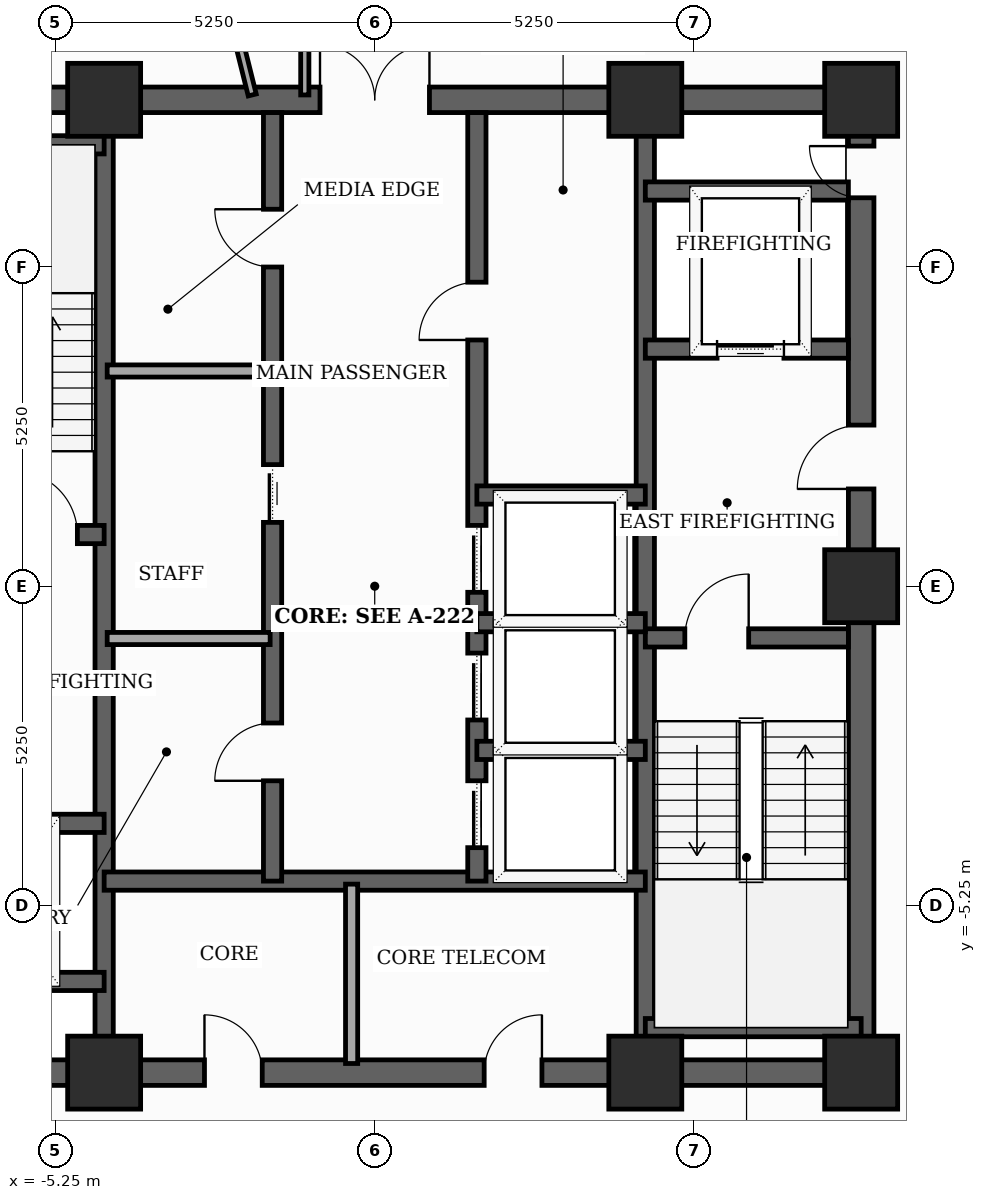
"""IFC4 building model, lengths in metres.
Left out: names, types, materials, properties, quantities, classifications, styles, units other than length and angle.
Written with IfcOpenShell. Run it as: python <this file> out.ifc"""

import sys

from ifc_helpers import new_model, si_unit, direction, frame, frame_2d, origin, origin_2d, place, context, subcontext, project, spatial, rectangle, extrude, element, fill, save


model = new_model("IFC4")
c1 = context("Model", 3, precision=1e-05, world=origin(), true_north=direction((0.0, 1.0)))
c2 = subcontext(c1, "Body", "Model", "MODEL_VIEW")
j1 = project(units=[si_unit("LENGTHUNIT", "METRE"), si_unit("PLANEANGLEUNIT", "RADIAN")], contexts=[c1])
p1 = place(None, origin())
s1 = spatial("IfcSite", under=j1, at=p1, CompositionType="ELEMENT")
p2 = place(p1, origin())
s2 = spatial("IfcBuilding", under=s1, at=p2, CompositionType="ELEMENT")
p3 = place(p2, frame((0.0, 0.0, 226.3)))
s3 = spatial("IfcBuildingStorey", under=s2, at=p3, CompositionType="ELEMENT", Elevation=226.3)
for number, where, z_axis, x_axis in (
    (1, (-4.45, -8.0, 0.0), (0.0, 0.0, 1.0), (1.0, 0.0, 0.0)),
    (2, (4.45, -8.0, 0.0), (0.0, 0.0, 1.0), (1.0, 0.0, 0.0)),
    (3, (8.0, -8.0, 0.0), (0.0, 0.0, 1.0), (1.0, 0.0, 0.0)),
    (4, (8.0, 0.0, 0.0), (0.0, 0.0, 1.0), (1.0, 0.0, 0.0)),
    (5, (8.0, 8.0, 0.0), (0.0, 0.0, 1.0), (1.0, 0.0, 0.0)),
    (6, (4.45, 8.0, 0.0), (0.0, 0.0, 1.0), (1.0, 0.0, 0.0)),
    (7, (-4.45, 8.0, 0.0), (0.0, 0.0, 1.0), (1.0, 0.0, 0.0)),
):
    element("IfcColumn", number, at=place(p3, frame(where, z_axis=z_axis, x_axis=x_axis)), inside=s3, PredefinedType="COLUMN", context=c2, shape_type="SweptSolid", body=[
        extrude(rectangle(XDim=1.2, YDim=1.2, at=origin_2d()), origin(), (0.0, 0.0, 1.0), 3.7),
    ])
p4 = place(p3, frame((8.0, -8.0, 0.0), z_axis=(0.0, 0.0, 1.0), x_axis=(0.0, 1.0, 0.0)))
e8 = element("IfcWall", 8, at=p4, inside=s3, PredefinedType="SHEAR", context=c2, shape_type="SweptSolid", body=[
    extrude(rectangle(XDim=16.0, YDim=0.42, at=frame_2d((8.0, 0.0))), origin(), (0.0, 0.0, 1.0), 3.5),
])
p5 = place(p4, frame((9.6, 0.0, 0.0)))
e9 = element("IfcOpeningElement", 9, at=p5, cuts=e8, PredefinedType="OPENING", context=c2, shape_type="SweptSolid", body=[
    extrude(rectangle(XDim=1.05, YDim=2.15, at=frame_2d((0.525, 1.075))), frame((0.0, 0.22, 0.0), z_axis=(0.0, -1.0, 0.0), x_axis=(1.0, 0.0, 0.0)), (0.0, 0.0, 1.0), 0.44),
])
p6 = place(p4, frame((14.389, 0.0, 0.0)))
e10 = element("IfcOpeningElement", 10, at=p6, cuts=e8, PredefinedType="OPENING", context=c2, shape_type="SweptSolid", body=[
    extrude(rectangle(XDim=0.85, YDim=2.02, at=frame_2d((0.425, 1.01))), frame((0.0, 0.22, 0.0), z_axis=(0.0, -1.0, 0.0), x_axis=(1.0, 0.0, 0.0)), (0.0, 0.0, 1.0), 0.44),
])
p7 = place(p3, frame((-8.0, -8.0, 0.0), z_axis=(0.0, 0.0, 1.0), x_axis=(1.0, 0.0, 0.0)))
e11 = element("IfcWall", 11, at=p7, inside=s3, PredefinedType="SHEAR", context=c2, shape_type="SweptSolid", body=[
    extrude(rectangle(XDim=16.0, YDim=0.42, at=frame_2d((8.0, 0.0))), origin(), (0.0, 0.0, 1.0), 3.5),
])
p8 = place(p7, frame((5.2, 0.0, 0.0)))
e12 = element("IfcOpeningElement", 12, at=p8, cuts=e11, PredefinedType="OPENING", context=c2, shape_type="SweptSolid", body=[
    extrude(rectangle(XDim=0.95, YDim=2.1, at=frame_2d((0.475, 1.05))), frame((0.0, 0.22, 0.0), z_axis=(0.0, -1.0, 0.0), x_axis=(1.0, 0.0, 0.0)), (0.0, 0.0, 1.0), 0.44),
])
p9 = place(p7, frame((9.8, 0.0, 0.0)))
e13 = element("IfcOpeningElement", 13, at=p9, cuts=e11, PredefinedType="OPENING", context=c2, shape_type="SweptSolid", body=[
    extrude(rectangle(XDim=0.95, YDim=2.1, at=frame_2d((0.475, 1.05))), frame((0.0, 0.22, 0.0), z_axis=(0.0, -1.0, 0.0), x_axis=(1.0, 0.0, 0.0)), (0.0, 0.0, 1.0), 0.44),
])
p10 = place(p3, frame((-8.0, 8.0, 0.0), z_axis=(0.0, 0.0, 1.0), x_axis=(1.0, 0.0, 0.0)))
e14 = element("IfcWall", 14, at=p10, inside=s3, PredefinedType="SHEAR", context=c2, shape_type="SweptSolid", body=[
    extrude(rectangle(XDim=16.0, YDim=0.42, at=frame_2d((8.0, 0.0))), origin(), (0.0, 0.0, 1.0), 3.5),
])
p11 = place(p10, frame((7.1, 0.0, 0.0)))
e15 = element("IfcOpeningElement", 15, at=p11, cuts=e14, PredefinedType="OPENING", context=c2, shape_type="SweptSolid", body=[
    extrude(rectangle(XDim=1.8, YDim=2.15, at=frame_2d((0.9, 1.075))), frame((0.0, 0.22, 0.0), z_axis=(0.0, -1.0, 0.0), x_axis=(1.0, 0.0, 0.0)), (0.0, 0.0, 1.0), 0.44),
])
for number, where, z_axis, x_axis in (
    (16, (-4.45, -7.79, 0.0), (0.0, 0.0, 1.0), (0.0, 1.0, 0.0)),
    (17, (4.45, -7.79, 0.0), (0.0, 0.0, 1.0), (0.0, 1.0, 0.0)),
):
    element("IfcWall", number, at=place(p3, frame(where, z_axis=z_axis, x_axis=x_axis)), inside=s3, PredefinedType="SHEAR", context=c2, shape_type="SweptSolid", body=[
        extrude(rectangle(XDim=15.58, YDim=0.3, at=frame_2d((7.79, 0.0))), origin(), (0.0, 0.0, 1.0), 3.5),
    ])
p12 = place(p3, frame((-7.79, 0.85, 0.0), z_axis=(0.0, 0.0, 1.0), x_axis=(1.0, 0.0, 0.0)))
e18 = element("IfcWall", 18, at=p12, inside=s3, PredefinedType="SHEAR", context=c2, shape_type="SweptSolid", body=[
    extrude(rectangle(XDim=3.34, YDim=0.3, at=frame_2d((1.67, 0.0))), origin(), (0.0, 0.0, 1.0), 3.5),
])
p13 = place(p12, frame((1.85, 0.0, 0.0)))
e19 = element("IfcOpeningElement", 19, at=p13, cuts=e18, PredefinedType="OPENING", context=c2, shape_type="SweptSolid", body=[
    extrude(rectangle(XDim=1.05, YDim=2.15, at=frame_2d((0.525, 1.075))), frame((0.0, 0.16, 0.0), z_axis=(0.0, -1.0, 0.0), x_axis=(1.0, 0.0, 0.0)), (0.0, 0.0, 1.0), 0.32),
])
p14 = place(p3, frame((-7.79, 7.26, 0.0), z_axis=(0.0, 0.0, 1.0), x_axis=(1.0, 0.0, 0.0)))
e20 = element("IfcWall", 20, at=p14, inside=s3, PredefinedType="SHEAR", context=c2, shape_type="SweptSolid", body=[
    extrude(rectangle(XDim=3.34, YDim=0.3, at=frame_2d((1.67, 0.0))), origin(), (0.0, 0.0, 1.0), 3.5),
])
p15 = place(p3, frame((4.45, -0.85, 0.0), z_axis=(0.0, 0.0, 1.0), x_axis=(1.0, 0.0, 0.0)))
e21 = element("IfcWall", 21, at=p15, inside=s3, PredefinedType="SHEAR", context=c2, shape_type="SweptSolid", body=[
    extrude(rectangle(XDim=3.34, YDim=0.3, at=frame_2d((1.67, 0.0))), origin(), (0.0, 0.0, 1.0), 3.5),
])
p16 = place(p15, frame((0.65, 0.0, 0.0)))
e22 = element("IfcOpeningElement", 22, at=p16, cuts=e21, PredefinedType="OPENING", context=c2, shape_type="SweptSolid", body=[
    extrude(rectangle(XDim=1.05, YDim=2.15, at=frame_2d((0.525, 1.075))), frame((0.0, 0.16, 0.0), z_axis=(0.0, -1.0, 0.0), x_axis=(1.0, 0.0, 0.0)), (0.0, 0.0, 1.0), 0.32),
])
p17 = place(p3, frame((4.45, -7.26, 0.0), z_axis=(0.0, 0.0, 1.0), x_axis=(1.0, 0.0, 0.0)))
e23 = element("IfcWall", 23, at=p17, inside=s3, PredefinedType="SHEAR", context=c2, shape_type="SweptSolid", body=[
    extrude(rectangle(XDim=3.55, YDim=0.3, at=frame_2d((1.775, 0.0))), origin(), (0.0, 0.0, 1.0), 3.5),
])
p18 = place(p3, frame((-7.79, -3.9, 0.0), z_axis=(0.0, 0.0, 1.0), x_axis=(1.0, 0.0, 0.0)))
e24 = element("IfcWall", 24, at=p18, inside=s3, PredefinedType="SHEAR", context=c2, shape_type="SweptSolid", body=[
    extrude(rectangle(XDim=3.34, YDim=0.3, at=frame_2d((1.67, 0.0))), origin(), (0.0, 0.0, 1.0), 3.5),
])
p19 = place(p18, frame((1.27, 0.0, 0.0)))
e25 = element("IfcOpeningElement", 25, at=p19, cuts=e24, PredefinedType="OPENING", context=c2, shape_type="SweptSolid", body=[
    extrude(rectangle(XDim=1.1, YDim=2.1, at=frame_2d((0.55, 1.05))), frame((0.0, 0.16, 0.0), z_axis=(0.0, -1.0, 0.0), x_axis=(1.0, 0.0, 0.0)), (0.0, 0.0, 1.0), 0.32),
])
p20 = place(p3, frame((-7.79, -6.5, 0.0), z_axis=(0.0, 0.0, 1.0), x_axis=(1.0, 0.0, 0.0)))
e26 = element("IfcWall", 26, at=p20, inside=s3, PredefinedType="SHEAR", context=c2, shape_type="SweptSolid", body=[
    extrude(rectangle(XDim=3.34, YDim=0.3, at=frame_2d((1.67, 0.0))), origin(), (0.0, 0.0, 1.0), 3.5),
])
p21 = place(p3, frame((4.45, 3.9, 0.0), z_axis=(0.0, 0.0, 1.0), x_axis=(1.0, 0.0, 0.0)))
e27 = element("IfcWall", 27, at=p21, inside=s3, PredefinedType="SHEAR", context=c2, shape_type="SweptSolid", body=[
    extrude(rectangle(XDim=3.34, YDim=0.3, at=frame_2d((1.67, 0.0))), origin(), (0.0, 0.0, 1.0), 3.5),
])
p22 = place(p21, frame((1.18, 0.0, 0.0)))
e28 = element("IfcOpeningElement", 28, at=p22, cuts=e27, PredefinedType="OPENING", context=c2, shape_type="SweptSolid", body=[
    extrude(rectangle(XDim=1.1, YDim=2.1, at=frame_2d((0.55, 1.05))), frame((0.0, 0.16, 0.0), z_axis=(0.0, -1.0, 0.0), x_axis=(1.0, 0.0, 0.0)), (0.0, 0.0, 1.0), 0.32),
])
p23 = place(p3, frame((4.45, 6.5, 0.0), z_axis=(0.0, 0.0, 1.0), x_axis=(1.0, 0.0, 0.0)))
e29 = element("IfcWall", 29, at=p23, inside=s3, PredefinedType="SHEAR", context=c2, shape_type="SweptSolid", body=[
    extrude(rectangle(XDim=3.34, YDim=0.3, at=frame_2d((1.67, 0.0))), origin(), (0.0, 0.0, 1.0), 3.5),
])
p24 = place(p3, frame((-4.45, -4.85, 0.0), z_axis=(0.0, 0.0, 1.0), x_axis=(1.0, 0.0, 0.0)))
e30 = element("IfcWall", 30, at=p24, inside=s3, PredefinedType="SHEAR", context=c2, shape_type="SweptSolid", body=[
    extrude(rectangle(XDim=8.9, YDim=0.3, at=frame_2d((4.45, 0.0))), origin(), (0.0, 0.0, 1.0), 3.5),
])
p25 = place(p3, frame((-1.68, -4.85, 0.0), z_axis=(0.0, 0.0, 1.0), x_axis=(0.0, 1.0, 0.0)))
e31 = element("IfcWall", 31, at=p25, inside=s3, PredefinedType="SHEAR", context=c2, shape_type="SweptSolid", body=[
    extrude(rectangle(XDim=12.64, YDim=0.3, at=frame_2d((6.32, 0.0))), origin(), (0.0, 0.0, 1.0), 3.5),
])
p26 = place(p25, frame((1.65, 0.0, 0.0)))
e32 = element("IfcOpeningElement", 32, at=p26, cuts=e31, PredefinedType="OPENING", context=c2, shape_type="SweptSolid", body=[
    extrude(rectangle(XDim=0.95, YDim=2.1, at=frame_2d((0.475, 1.05))), frame((0.0, 0.16, 0.0), z_axis=(0.0, -1.0, 0.0), x_axis=(1.0, 0.0, 0.0)), (0.0, 0.0, 1.0), 0.32),
])
p27 = place(p25, frame((5.9, 0.0, 0.0)))
e33 = element("IfcOpeningElement", 33, at=p27, cuts=e31, PredefinedType="OPENING", context=c2, shape_type="SweptSolid", body=[
    extrude(rectangle(XDim=0.95, YDim=2.1, at=frame_2d((0.475, 1.05))), frame((0.0, 0.16, 0.0), z_axis=(0.0, -1.0, 0.0), x_axis=(1.0, 0.0, 0.0)), (0.0, 0.0, 1.0), 0.32),
])
p28 = place(p25, frame((10.1, 0.0, 0.0)))
e34 = element("IfcOpeningElement", 34, at=p28, cuts=e31, PredefinedType="OPENING", context=c2, shape_type="SweptSolid", body=[
    extrude(rectangle(XDim=0.95, YDim=2.1, at=frame_2d((0.475, 1.05))), frame((0.0, 0.16, 0.0), z_axis=(0.0, -1.0, 0.0), x_axis=(1.0, 0.0, 0.0)), (0.0, 0.0, 1.0), 0.32),
])
p29 = place(p3, frame((1.68, -4.85, 0.0), z_axis=(0.0, 0.0, 1.0), x_axis=(0.0, 1.0, 0.0)))
e35 = element("IfcWall", 35, at=p29, inside=s3, PredefinedType="SHEAR", context=c2, shape_type="SweptSolid", body=[
    extrude(rectangle(XDim=12.64, YDim=0.3, at=frame_2d((6.32, 0.0))), origin(), (0.0, 0.0, 1.0), 3.5),
])
p30 = place(p29, frame((0.55, 0.0, 0.0)))
e36 = element("IfcOpeningElement", 36, at=p30, cuts=e35, PredefinedType="OPENING", context=c2, shape_type="SweptSolid", body=[
    extrude(rectangle(XDim=1.1, YDim=2.1, at=frame_2d((0.55, 1.05))), frame((0.0, 0.16, 0.0), z_axis=(0.0, -1.0, 0.0), x_axis=(1.0, 0.0, 0.0)), (0.0, 0.0, 1.0), 0.32),
])
p31 = place(p29, frame((2.65, 0.0, 0.0)))
e37 = element("IfcOpeningElement", 37, at=p31, cuts=e35, PredefinedType="OPENING", context=c2, shape_type="SweptSolid", body=[
    extrude(rectangle(XDim=1.1, YDim=2.1, at=frame_2d((0.55, 1.05))), frame((0.0, 0.16, 0.0), z_axis=(0.0, -1.0, 0.0), x_axis=(1.0, 0.0, 0.0)), (0.0, 0.0, 1.0), 0.32),
])
p32 = place(p29, frame((4.75, 0.0, 0.0)))
e38 = element("IfcOpeningElement", 38, at=p32, cuts=e35, PredefinedType="OPENING", context=c2, shape_type="SweptSolid", body=[
    extrude(rectangle(XDim=1.1, YDim=2.1, at=frame_2d((0.55, 1.05))), frame((0.0, 0.16, 0.0), z_axis=(0.0, -1.0, 0.0), x_axis=(1.0, 0.0, 0.0)), (0.0, 0.0, 1.0), 0.32),
])
p33 = place(p29, frame((8.9, 0.0, 0.0)))
e39 = element("IfcOpeningElement", 39, at=p33, cuts=e35, PredefinedType="OPENING", context=c2, shape_type="SweptSolid", body=[
    extrude(rectangle(XDim=0.95, YDim=2.1, at=frame_2d((0.475, 1.05))), frame((0.0, 0.16, 0.0), z_axis=(0.0, -1.0, 0.0), x_axis=(1.0, 0.0, 0.0)), (0.0, 0.0, 1.0), 0.32),
])
for number, where, z_axis, x_axis in (
    (40, (1.68, 1.5, 0.0), (0.0, 0.0, 1.0), (1.0, 0.0, 0.0)),
    (41, (1.68, -2.7, 0.0), (0.0, 0.0, 1.0), (1.0, 0.0, 0.0)),
    (42, (1.68, -0.6, 0.0), (0.0, 0.0, 1.0), (1.0, 0.0, 0.0)),
):
    element("IfcWall", number, at=place(p3, frame(where, z_axis=z_axis, x_axis=x_axis)), inside=s3, PredefinedType="SHEAR", context=c2, shape_type="SweptSolid", body=[
        extrude(rectangle(XDim=2.77, YDim=0.3, at=frame_2d((1.385, 0.0))), origin(), (0.0, 0.0, 1.0), 3.5),
    ])
p34 = place(p3, frame((-0.38, -7.85, 0.0), z_axis=(0.0, 0.0, 1.0), x_axis=(0.0, 1.0, 0.0)))
e43 = element("IfcWall", 43, at=p34, inside=s3, PredefinedType="SOLIDWALL", context=c2, shape_type="SweptSolid", body=[
    extrude(rectangle(XDim=2.95, YDim=0.2, at=frame_2d((1.475, 0.0))), origin(), (0.0, 0.0, 1.0), 2.885),
])
for number, where, z_axis, x_axis in (
    (44, (-4.4, -0.86, 0.0), (0.0, 0.0, 1.0), (1.0, 0.0, 0.0)),
    (45, (-4.4, 3.54, 0.0), (0.0, 0.0, 1.0), (1.0, 0.0, 0.0)),
):
    element("IfcWall", number, at=place(p3, frame(where, z_axis=z_axis, x_axis=x_axis)), inside=s3, PredefinedType="SOLIDWALL", context=c2, shape_type="SweptSolid", body=[
        extrude(rectangle(XDim=2.68, YDim=0.2, at=frame_2d((1.34, 0.0))), origin(), (0.0, 0.0, 1.0), 3.5),
    ])
p35 = place(p3, frame((-1.15, 10.65, 0.0), z_axis=(0.0, 0.0, 1.0), x_axis=(0.0, -1.0, 0.0)))
e46 = element("IfcWall", 46, at=p35, inside=s3, PredefinedType="PARTITIONING", context=c2, shape_type="SweptSolid", body=[
    extrude(rectangle(XDim=2.57, YDim=0.135, at=frame_2d((1.285, 0.0))), origin(), (0.0, 0.0, 1.0), 2.885),
])
p36 = place(p3, frame((-3.803, 15.255, 0.0), z_axis=(0.0, 0.0, 1.0), x_axis=(0.241851911951, -0.970313172479, 0.0)))
e47 = element("IfcWall", 47, at=p36, inside=s3, PredefinedType="PARTITIONING", context=c2, shape_type="SweptSolid", body=[
    extrude(rectangle(XDim=7.394, YDim=0.135, at=frame_2d((3.697, 0.0))), origin(), (0.0, 0.0, 1.0), 2.885),
])
p37 = place(p5, origin())
e48 = element("IfcDoor", 48, at=p37, inside=s3, OperationType="SINGLE_SWING_LEFT", PredefinedType="DOOR", context=c2, shape_type="SweptSolid", body=[
    extrude(rectangle(XDim=1.05, YDim=2.15, at=frame_2d((0.525, 1.075))), frame((0.0, 0.025, 0.0), z_axis=(0.0, -1.0, 0.0), x_axis=(1.0, 0.0, 0.0)), (0.0, 0.0, 1.0), 0.05),
])
fill(e9, e48)
p38 = place(p6, origin())
e49 = element("IfcDoor", 49, at=p38, inside=s3, OperationType="SINGLE_SWING_RIGHT", PredefinedType="TRAPDOOR", context=c2, shape_type="SweptSolid", body=[
    extrude(rectangle(XDim=0.85, YDim=2.02, at=frame_2d((0.425, 1.01))), frame((0.0, 0.025, 0.0), z_axis=(0.0, -1.0, 0.0), x_axis=(1.0, 0.0, 0.0)), (0.0, 0.0, 1.0), 0.05),
])
fill(e10, e49)
p39 = place(p8, origin())
e50 = element("IfcDoor", 50, at=p39, inside=s3, OperationType="SINGLE_SWING_LEFT", PredefinedType="DOOR", context=c2, shape_type="SweptSolid", body=[
    extrude(rectangle(XDim=0.95, YDim=2.1, at=frame_2d((0.475, 1.05))), frame((0.0, 0.025, 0.0), z_axis=(0.0, -1.0, 0.0), x_axis=(1.0, 0.0, 0.0)), (0.0, 0.0, 1.0), 0.05),
])
fill(e12, e50)
p40 = place(p9, origin())
e51 = element("IfcDoor", 51, at=p40, inside=s3, OperationType="SINGLE_SWING_RIGHT", PredefinedType="DOOR", context=c2, shape_type="SweptSolid", body=[
    extrude(rectangle(XDim=0.95, YDim=2.1, at=frame_2d((0.475, 1.05))), frame((0.0, 0.025, 0.0), z_axis=(0.0, -1.0, 0.0), x_axis=(1.0, 0.0, 0.0)), (0.0, 0.0, 1.0), 0.05),
])
fill(e13, e51)
p41 = place(p11, origin())
e52 = element("IfcDoor", 52, at=p41, inside=s3, OperationType="DOUBLE_DOOR_SINGLE_SWING", PredefinedType="DOOR", context=c2, shape_type="SweptSolid", body=[
    extrude(rectangle(XDim=1.8, YDim=2.15, at=frame_2d((0.9, 1.075))), frame((0.0, 0.025, 0.0), z_axis=(0.0, -1.0, 0.0), x_axis=(1.0, 0.0, 0.0)), (0.0, 0.0, 1.0), 0.05),
])
fill(e15, e52)
p42 = place(p13, origin())
e53 = element("IfcDoor", 53, at=p42, inside=s3, OperationType="SINGLE_SWING_LEFT", PredefinedType="DOOR", context=c2, shape_type="SweptSolid", body=[
    extrude(rectangle(XDim=1.05, YDim=2.15, at=frame_2d((0.525, 1.075))), frame((0.0, 0.025, 0.0), z_axis=(0.0, -1.0, 0.0), x_axis=(1.0, 0.0, 0.0)), (0.0, 0.0, 1.0), 0.05),
])
fill(e19, e53)
p43 = place(p16, origin())
e54 = element("IfcDoor", 54, at=p43, inside=s3, OperationType="SINGLE_SWING_RIGHT", PredefinedType="DOOR", context=c2, shape_type="SweptSolid", body=[
    extrude(rectangle(XDim=1.05, YDim=2.15, at=frame_2d((0.525, 1.075))), frame((0.0, 0.025, 0.0), z_axis=(0.0, -1.0, 0.0), x_axis=(1.0, 0.0, 0.0)), (0.0, 0.0, 1.0), 0.05),
])
fill(e22, e54)
p44 = place(p22, origin())
e55 = element("IfcDoor", 55, at=p44, inside=s3, OperationType="SLIDING_TO_LEFT", PredefinedType="DOOR", context=c2, shape_type="SweptSolid", body=[
    extrude(rectangle(XDim=1.1, YDim=2.1, at=frame_2d((0.55, 1.05))), frame((0.0, 0.025, 0.0), z_axis=(0.0, -1.0, 0.0), x_axis=(1.0, 0.0, 0.0)), (0.0, 0.0, 1.0), 0.05),
])
fill(e28, e55)
p45 = place(p26, origin())
e56 = element("IfcDoor", 56, at=p45, inside=s3, OperationType="SINGLE_SWING_LEFT", PredefinedType="DOOR", context=c2, shape_type="SweptSolid", body=[
    extrude(rectangle(XDim=0.95, YDim=2.1, at=frame_2d((0.475, 1.05))), frame((0.0, 0.025, 0.0), z_axis=(0.0, -1.0, 0.0), x_axis=(1.0, 0.0, 0.0)), (0.0, 0.0, 1.0), 0.05),
])
fill(e32, e56)
p46 = place(p27, origin())
e57 = element("IfcDoor", 57, at=p46, inside=s3, OperationType="SLIDING_TO_LEFT", PredefinedType="DOOR", context=c2, shape_type="SweptSolid", body=[
    extrude(rectangle(XDim=0.95, YDim=2.1, at=frame_2d((0.475, 1.05))), frame((0.0, 0.025, 0.0), z_axis=(0.0, -1.0, 0.0), x_axis=(1.0, 0.0, 0.0)), (0.0, 0.0, 1.0), 0.05),
])
fill(e33, e57)
p47 = place(p28, origin())
e58 = element("IfcDoor", 58, at=p47, inside=s3, OperationType="SINGLE_SWING_RIGHT", PredefinedType="DOOR", context=c2, shape_type="SweptSolid", body=[
    extrude(rectangle(XDim=0.95, YDim=2.1, at=frame_2d((0.475, 1.05))), frame((0.0, 0.025, 0.0), z_axis=(0.0, -1.0, 0.0), x_axis=(1.0, 0.0, 0.0)), (0.0, 0.0, 1.0), 0.05),
])
fill(e34, e58)
p48 = place(p30, origin())
e59 = element("IfcDoor", 59, at=p48, inside=s3, OperationType="SLIDING_TO_LEFT", PredefinedType="DOOR", context=c2, shape_type="SweptSolid", body=[
    extrude(rectangle(XDim=1.1, YDim=2.1, at=frame_2d((0.55, 1.05))), frame((0.0, 0.025, 0.0), z_axis=(0.0, -1.0, 0.0), x_axis=(1.0, 0.0, 0.0)), (0.0, 0.0, 1.0), 0.05),
])
fill(e36, e59)
p49 = place(p31, origin())
e60 = element("IfcDoor", 60, at=p49, inside=s3, OperationType="SLIDING_TO_LEFT", PredefinedType="DOOR", context=c2, shape_type="SweptSolid", body=[
    extrude(rectangle(XDim=1.1, YDim=2.1, at=frame_2d((0.55, 1.05))), frame((0.0, 0.025, 0.0), z_axis=(0.0, -1.0, 0.0), x_axis=(1.0, 0.0, 0.0)), (0.0, 0.0, 1.0), 0.05),
])
fill(e37, e60)
p50 = place(p32, origin())
e61 = element("IfcDoor", 61, at=p50, inside=s3, OperationType="SLIDING_TO_LEFT", PredefinedType="DOOR", context=c2, shape_type="SweptSolid", body=[
    extrude(rectangle(XDim=1.1, YDim=2.1, at=frame_2d((0.55, 1.05))), frame((0.0, 0.025, 0.0), z_axis=(0.0, -1.0, 0.0), x_axis=(1.0, 0.0, 0.0)), (0.0, 0.0, 1.0), 0.05),
])
fill(e38, e61)
p51 = place(p33, origin())
e62 = element("IfcDoor", 62, at=p51, inside=s3, OperationType="SINGLE_SWING_LEFT", PredefinedType="DOOR", context=c2, shape_type="SweptSolid", body=[
    extrude(rectangle(XDim=0.95, YDim=2.1, at=frame_2d((0.475, 1.05))), frame((0.0, 0.025, 0.0), z_axis=(0.0, -1.0, 0.0), x_axis=(1.0, 0.0, 0.0)), (0.0, 0.0, 1.0), 0.05),
])
fill(e39, e62)
save(model, sys.argv[1])
